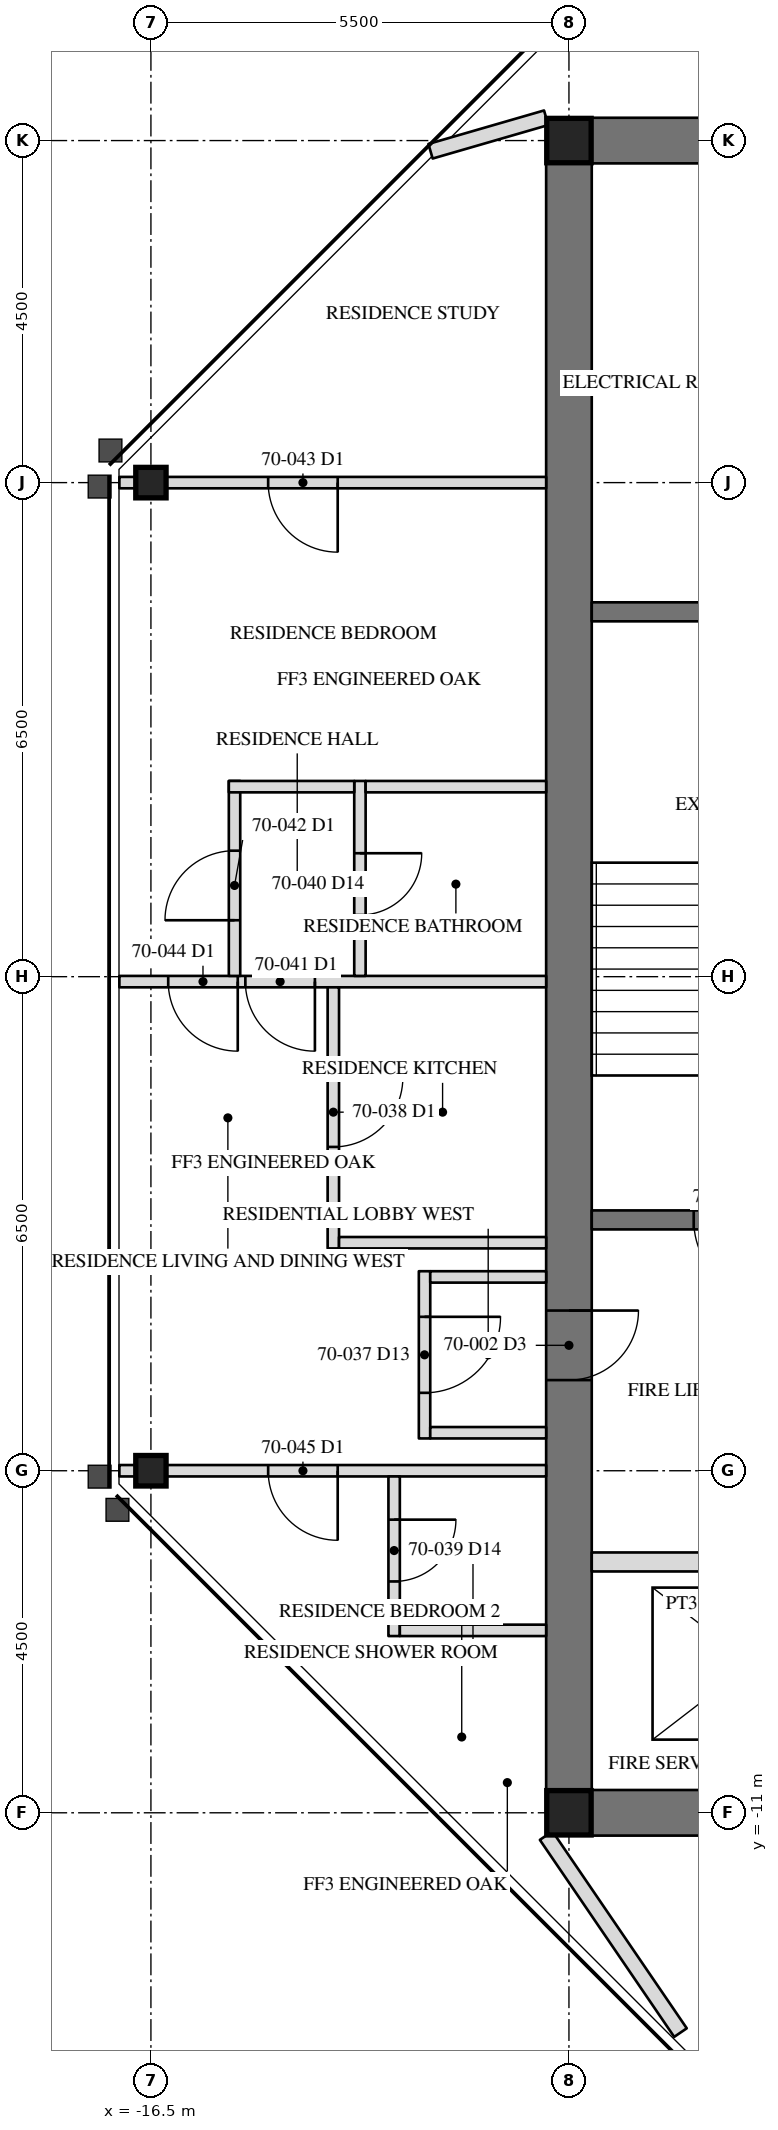
"""IFC4 building model, lengths in metres.
Left out: names, types, materials, properties, quantities, classifications, styles, units other than length and angle.
Written with IfcOpenShell. Run it as: python <this file> out.ifc"""

import sys

from ifc_helpers import new_model, si_unit, direction, frame, frame_2d, origin, origin_2d, place, context, subcontext, project, spatial, rectangle, hollow_rectangle, i_section, extrude, element, fill, save


model = new_model("IFC4")
c1 = context("Model", 3, precision=1e-05, world=origin(), true_north=direction((0.0, 1.0)))
c2 = subcontext(c1, "Body", "Model", "MODEL_VIEW")
j1 = project(units=[si_unit("LENGTHUNIT", "METRE"), si_unit("PLANEANGLEUNIT", "RADIAN")], contexts=[c1])
p1 = place(None, origin())
s1 = spatial("IfcSite", under=j1, at=p1, CompositionType="ELEMENT")
p2 = place(p1, origin())
s2 = spatial("IfcBuilding", under=s1, at=p2, CompositionType="ELEMENT")
p3 = place(p2, frame((0.0, 0.0, 284.8)))
s3 = spatial("IfcBuildingStorey", under=s2, at=p3, CompositionType="ELEMENT", Elevation=284.8)
for number, where, z_axis, x_axis in (
    (1, (-16.5, -6.5, 0.0), (0.0, 0.0, 1.0), (0.0, 1.0, 0.0)),
    (2, (-16.5, 6.5, 0.0), (0.0, 0.0, 1.0), (0.0, 1.0, 0.0)),
):
    element("IfcColumn", number, at=place(p3, frame(where, z_axis=z_axis, x_axis=x_axis)), inside=s3, PredefinedType="COLUMN", context=c2, shape_type="SweptSolid", body=[
        extrude(i_section(OverallWidth=0.401, OverallDepth=0.399, WebThickness=0.025, FlangeThickness=0.04, at=origin_2d()), origin(), (0.0, 0.0, 1.0), 3.6),
    ])
p4 = place(p3, frame((-11.0, 11.0, 0.0), z_axis=(0.0, 0.0, 1.0), x_axis=(0.0, -1.0, 0.0)))
e3 = element("IfcWall", 3, at=p4, inside=s3, PredefinedType="SHEAR", context=c2, shape_type="SweptSolid", body=[
    extrude(rectangle(XDim=22.0, YDim=0.6, at=frame_2d((11.0, 0.0))), origin(), (0.0, 0.0, 1.0), 3.6),
])
p5 = place(p4, frame((15.393, 0.0, 0.0)))
e4 = element("IfcOpeningElement", 4, at=p5, cuts=e3, PredefinedType="OPENING", context=c2, shape_type="SweptSolid", body=[
    extrude(rectangle(XDim=0.915, YDim=2.134, at=frame_2d((0.458, 1.067))), frame((0.0, 0.31, 0.0), z_axis=(0.0, -1.0, 0.0), x_axis=(1.0, 0.0, 0.0)), (0.0, 0.0, 1.0), 0.62),
])
for number, where, z_axis, x_axis in (
    (5, (-6.5, 11.0, 0.0), (0.0, 0.0, 1.0), (-1.0, 0.0, 0.0)),
    (6, (-11.0, -11.0, 0.0), (0.0, 0.0, 1.0), (1.0, 0.0, 0.0)),
):
    element("IfcWall", number, at=place(p3, frame(where, z_axis=z_axis, x_axis=x_axis)), inside=s3, PredefinedType="SHEAR", context=c2, shape_type="SweptSolid", body=[
        extrude(rectangle(XDim=4.5, YDim=0.6, at=frame_2d((2.25, 0.0))), origin(), (0.0, 0.0, 1.0), 3.6),
    ])
for number, where, z_axis, x_axis in (
    (7, (-11.0, 11.0, 0.0), (0.0, 0.0, 1.0), (1.0, 0.0, 0.0)),
    (8, (-11.0, -11.0, 0.0), (0.0, 0.0, 1.0), (1.0, 0.0, 0.0)),
):
    element("IfcColumn", number, at=place(p3, frame(where, z_axis=z_axis, x_axis=x_axis)), inside=s3, PredefinedType="COLUMN", context=c2, shape_type="SweptSolid", body=[
        extrude(hollow_rectangle(XDim=0.584, YDim=0.584, WallThickness=0.051, at=origin_2d()), origin(), (0.0, 0.0, 1.0), 3.6),
    ])
p6 = place(p3, frame((-6.95, 4.8, 0.0), z_axis=(0.0, 0.0, 1.0), x_axis=(-1.0, 0.0, 0.0)))
e9 = element("IfcWall", 9, at=p6, inside=s3, PredefinedType="SOLIDWALL", context=c2, shape_type="SweptSolid", body=[
    extrude(rectangle(XDim=3.75, YDim=0.25, at=frame_2d((1.875, 0.0))), origin(), (0.0, 0.0, 1.0), 3.41),
])
p7 = place(p3, frame((-6.95, -3.2, 0.0), z_axis=(0.0, 0.0, 1.0), x_axis=(-1.0, 0.0, 0.0)))
e10 = element("IfcWall", 10, at=p7, inside=s3, PredefinedType="SOLIDWALL", context=c2, shape_type="SweptSolid", body=[
    extrude(rectangle(XDim=3.75, YDim=0.25, at=frame_2d((1.875, 0.0))), origin(), (0.0, 0.0, 1.0), 3.41),
])
p8 = place(p7, frame((1.342, 0.0, 0.0)))
e11 = element("IfcOpeningElement", 11, at=p8, cuts=e10, PredefinedType="OPENING", context=c2, shape_type="SweptSolid", body=[
    extrude(rectangle(XDim=1.067, YDim=2.134, at=frame_2d((0.533, 1.067))), frame((0.0, 0.135, 0.0), z_axis=(0.0, -1.0, 0.0), x_axis=(1.0, 0.0, 0.0)), (0.0, 0.0, 1.0), 0.27),
])
p9 = place(p3, frame((-6.95, -7.7, 0.0), z_axis=(0.0, 0.0, 1.0), x_axis=(-1.0, 0.0, 0.0)))
e12 = element("IfcWall", 12, at=p9, inside=s3, PredefinedType="PARTITIONING", context=c2, shape_type="SweptSolid", body=[
    extrude(rectangle(XDim=3.75, YDim=0.25, at=frame_2d((1.875, 0.0))), origin(), (0.0, 0.0, 1.0), 3.41),
])
p10 = place(p9, frame((0.45, 0.0, 0.0)))
e13 = element("IfcOpeningElement", 13, at=p10, cuts=e12, PredefinedType="OPENING", context=c2, shape_type="SweptSolid", body=[
    extrude(rectangle(XDim=1.219, YDim=2.134, at=frame_2d((0.609, 1.067))), frame((0.0, 0.135, 0.0), z_axis=(0.0, -1.0, 0.0), x_axis=(1.0, 0.0, 0.0)), (0.0, 0.0, 1.0), 0.27),
])
p11 = place(p3, frame((-11.3, 11.3, 0.0), z_axis=(0.0, 0.0, 1.0), x_axis=(-0.960552344683, -0.278099250491, 0.0)))
e14 = element("IfcWall", 14, at=p11, inside=s3, PredefinedType="PARTITIONING", context=c2, shape_type="SweptSolid", body=[
    extrude(rectangle(XDim=1.584, YDim=0.2, at=frame_2d((0.792, 0.0))), origin(), (0.0, 0.0, 1.0), 3.41),
])
p12 = place(p3, frame((-11.3, -11.3, 0.0), z_axis=(0.0, 0.0, 1.0), x_axis=(0.563469639691, -0.826136771453, 0.0)))
e15 = element("IfcWall", 15, at=p12, inside=s3, PredefinedType="PARTITIONING", context=c2, shape_type="SweptSolid", body=[
    extrude(rectangle(XDim=3.137, YDim=0.2, at=frame_2d((1.568, 0.0))), origin(), (0.0, 0.0, 1.0), 2.704),
])
p13 = place(p3, frame((-11.3, 6.5, 0.0), z_axis=(0.0, 0.0, 1.0), x_axis=(-1.0, 0.0, 0.0)))
e16 = element("IfcWall", 16, at=p13, inside=s3, PredefinedType="PARTITIONING", context=c2, shape_type="SweptSolid", body=[
    extrude(rectangle(XDim=5.615, YDim=0.15, at=frame_2d((2.808, 0.0))), origin(), (0.0, 0.0, 1.0), 2.966),
])
p14 = place(p13, frame((2.742, 0.0, 0.0)))
e17 = element("IfcOpeningElement", 17, at=p14, cuts=e16, PredefinedType="OPENING", context=c2, shape_type="SweptSolid", body=[
    extrude(rectangle(XDim=0.915, YDim=2.134, at=frame_2d((0.458, 1.067))), frame((0.0, 0.085, 0.0), z_axis=(0.0, -1.0, 0.0), x_axis=(1.0, 0.0, 0.0)), (0.0, 0.0, 1.0), 0.17),
])
p15 = place(p3, frame((-11.3, -0.065, 0.0), z_axis=(0.0, 0.0, 1.0), x_axis=(-1.0, 0.0, 0.0)))
e18 = element("IfcWall", 18, at=p15, inside=s3, PredefinedType="PARTITIONING", context=c2, shape_type="SweptSolid", body=[
    extrude(rectangle(XDim=5.615, YDim=0.15, at=frame_2d((2.808, 0.0))), origin(), (0.0, 0.0, 1.0), 2.709),
])
p16 = place(p15, frame((3.042, 0.0, 0.0)))
e19 = element("IfcOpeningElement", 19, at=p16, cuts=e18, PredefinedType="OPENING", context=c2, shape_type="SweptSolid", body=[
    extrude(rectangle(XDim=0.915, YDim=2.134, at=frame_2d((0.458, 1.067))), frame((0.0, 0.085, 0.0), z_axis=(0.0, -1.0, 0.0), x_axis=(1.0, 0.0, 0.0)), (0.0, 0.0, 1.0), 0.17),
])
p17 = place(p15, frame((4.058, 0.0, 0.0)))
e20 = element("IfcOpeningElement", 20, at=p17, cuts=e18, PredefinedType="OPENING", context=c2, shape_type="SweptSolid", body=[
    extrude(rectangle(XDim=0.915, YDim=2.134, at=frame_2d((0.458, 1.067))), frame((0.0, 0.085, 0.0), z_axis=(0.0, -1.0, 0.0), x_axis=(1.0, 0.0, 0.0)), (0.0, 0.0, 1.0), 0.17),
])
p18 = place(p3, frame((-11.3, -6.5, 0.0), z_axis=(0.0, 0.0, 1.0), x_axis=(-1.0, 0.0, 0.0)))
e21 = element("IfcWall", 21, at=p18, inside=s3, PredefinedType="PARTITIONING", context=c2, shape_type="SweptSolid", body=[
    extrude(rectangle(XDim=5.615, YDim=0.15, at=frame_2d((2.808, 0.0))), origin(), (0.0, 0.0, 1.0), 2.966),
])
p19 = place(p18, frame((2.742, 0.0, 0.0)))
e22 = element("IfcOpeningElement", 22, at=p19, cuts=e21, PredefinedType="OPENING", context=c2, shape_type="SweptSolid", body=[
    extrude(rectangle(XDim=0.915, YDim=2.134, at=frame_2d((0.458, 1.067))), frame((0.0, 0.085, 0.0), z_axis=(0.0, -1.0, 0.0), x_axis=(1.0, 0.0, 0.0)), (0.0, 0.0, 1.0), 0.17),
])
p20 = place(p3, frame((-12.9, -3.875, 0.0), z_axis=(0.0, 0.0, 1.0), x_axis=(0.0, -1.0, 0.0)))
e23 = element("IfcWall", 23, at=p20, inside=s3, PredefinedType="PARTITIONING", context=c2, shape_type="SweptSolid", body=[
    extrude(rectangle(XDim=2.2, YDim=0.15, at=frame_2d((1.1, 0.0))), origin(), (0.0, 0.0, 1.0), 3.41),
])
p21 = place(p20, frame((0.6, 0.0, 0.0)))
e24 = element("IfcOpeningElement", 24, at=p21, cuts=e23, PredefinedType="OPENING", context=c2, shape_type="SweptSolid", body=[
    extrude(rectangle(XDim=1.0, YDim=2.134, at=frame_2d((0.5, 1.067))), frame((0.0, 0.085, 0.0), z_axis=(0.0, -1.0, 0.0), x_axis=(1.0, 0.0, 0.0)), (0.0, 0.0, 1.0), 0.17),
])
for number, where, z_axis, x_axis in (
    (25, (-11.3, -3.95, 0.0), (0.0, 0.0, 1.0), (-1.0, 0.0, 0.0)),
    (26, (-11.3, -6.0, 0.0), (0.0, 0.0, 1.0), (-1.0, 0.0, 0.0)),
):
    element("IfcWall", number, at=place(p3, frame(where, z_axis=z_axis, x_axis=x_axis)), inside=s3, PredefinedType="PARTITIONING", context=c2, shape_type="SweptSolid", body=[
        extrude(rectangle(XDim=1.525, YDim=0.15, at=frame_2d((0.762, 0.0))), origin(), (0.0, 0.0, 1.0), 3.41),
    ])
p22 = place(p3, frame((-14.1, -0.14, 0.0), z_axis=(0.0, 0.0, 1.0), x_axis=(0.0, -1.0, 0.0)))
e27 = element("IfcWall", 27, at=p22, inside=s3, PredefinedType="PARTITIONING", context=c2, shape_type="SweptSolid", body=[
    extrude(rectangle(XDim=3.435, YDim=0.15, at=frame_2d((1.718, 0.0))), origin(), (0.0, 0.0, 1.0), 3.41),
])
p23 = place(p22, frame((1.185, 0.0, 0.0)))
e28 = element("IfcOpeningElement", 28, at=p23, cuts=e27, PredefinedType="OPENING", context=c2, shape_type="SweptSolid", body=[
    extrude(rectangle(XDim=0.915, YDim=2.134, at=frame_2d((0.458, 1.067))), frame((0.0, 0.085, 0.0), z_axis=(0.0, -1.0, 0.0), x_axis=(1.0, 0.0, 0.0)), (0.0, 0.0, 1.0), 0.17),
])
p24 = place(p3, frame((-11.3, -3.5, 0.0), z_axis=(0.0, 0.0, 1.0), x_axis=(-1.0, 0.0, 0.0)))
e29 = element("IfcWall", 29, at=p24, inside=s3, PredefinedType="PARTITIONING", context=c2, shape_type="SweptSolid", body=[
    extrude(rectangle(XDim=2.725, YDim=0.15, at=frame_2d((1.362, 0.0))), origin(), (0.0, 0.0, 1.0), 3.41),
])
p25 = place(p3, frame((-13.3, -6.575, 0.0), z_axis=(0.0, 0.0, 1.0), x_axis=(0.0, -1.0, 0.0)))
e30 = element("IfcWall", 30, at=p25, inside=s3, PredefinedType="PARTITIONING", context=c2, shape_type="SweptSolid", body=[
    extrude(rectangle(XDim=2.1, YDim=0.15, at=frame_2d((1.05, 0.0))), origin(), (0.0, 0.0, 1.0), 3.41),
])
p26 = place(p25, frame((0.569, 0.0, 0.0)))
e31 = element("IfcOpeningElement", 31, at=p26, cuts=e30, PredefinedType="OPENING", context=c2, shape_type="SweptSolid", body=[
    extrude(rectangle(XDim=0.813, YDim=2.032, at=frame_2d((0.406, 1.016))), frame((0.0, 0.085, 0.0), z_axis=(0.0, -1.0, 0.0), x_axis=(1.0, 0.0, 0.0)), (0.0, 0.0, 1.0), 0.17),
])
p27 = place(p3, frame((-11.3, -8.6, 0.0), z_axis=(0.0, 0.0, 1.0), x_axis=(-1.0, 0.0, 0.0)))
e32 = element("IfcWall", 32, at=p27, inside=s3, PredefinedType="PARTITIONING", context=c2, shape_type="SweptSolid", body=[
    extrude(rectangle(XDim=1.925, YDim=0.15, at=frame_2d((0.962, 0.0))), origin(), (0.0, 0.0, 1.0), 3.41),
])
p28 = place(p3, frame((-13.75, 2.575, 0.0), z_axis=(0.0, 0.0, 1.0), x_axis=(0.0, -1.0, 0.0)))
e33 = element("IfcWall", 33, at=p28, inside=s3, PredefinedType="PARTITIONING", context=c2, shape_type="SweptSolid", body=[
    extrude(rectangle(XDim=2.565, YDim=0.15, at=frame_2d((1.282, 0.0))), origin(), (0.0, 0.0, 1.0), 3.41),
])
p29 = place(p28, frame((0.951, 0.0, 0.0)))
e34 = element("IfcOpeningElement", 34, at=p29, cuts=e33, PredefinedType="OPENING", context=c2, shape_type="SweptSolid", body=[
    extrude(rectangle(XDim=0.813, YDim=2.032, at=frame_2d((0.406, 1.016))), frame((0.0, 0.085, 0.0), z_axis=(0.0, -1.0, 0.0), x_axis=(1.0, 0.0, 0.0)), (0.0, 0.0, 1.0), 0.17),
])
p30 = place(p3, frame((-11.3, 2.5, 0.0), z_axis=(0.0, 0.0, 1.0), x_axis=(-1.0, 0.0, 0.0)))
e35 = element("IfcWall", 35, at=p30, inside=s3, PredefinedType="PARTITIONING", context=c2, shape_type="SweptSolid", body=[
    extrude(rectangle(XDim=2.375, YDim=0.15, at=frame_2d((1.188, 0.0))), origin(), (0.0, 0.0, 1.0), 3.41),
])
p31 = place(p3, frame((-15.4, 0.01, 0.0), z_axis=(0.0, 0.0, 1.0), x_axis=(0.0, 1.0, 0.0)))
e36 = element("IfcWall", 36, at=p31, inside=s3, PredefinedType="PARTITIONING", context=c2, shape_type="SweptSolid", body=[
    extrude(rectangle(XDim=2.565, YDim=0.15, at=frame_2d((1.282, 0.0))), origin(), (0.0, 0.0, 1.0), 3.41),
])
p32 = place(p31, frame((0.732, 0.0, 0.0)))
e37 = element("IfcOpeningElement", 37, at=p32, cuts=e36, PredefinedType="OPENING", context=c2, shape_type="SweptSolid", body=[
    extrude(rectangle(XDim=0.915, YDim=2.134, at=frame_2d((0.458, 1.067))), frame((0.0, 0.085, 0.0), z_axis=(0.0, -1.0, 0.0), x_axis=(1.0, 0.0, 0.0)), (0.0, 0.0, 1.0), 0.17),
])
p33 = place(p3, frame((-13.825, 2.5, 0.0), z_axis=(0.0, 0.0, 1.0), x_axis=(-1.0, 0.0, 0.0)))
e38 = element("IfcWall", 38, at=p33, inside=s3, PredefinedType="PARTITIONING", context=c2, shape_type="SweptSolid", body=[
    extrude(rectangle(XDim=1.65, YDim=0.15, at=frame_2d((0.825, 0.0))), origin(), (0.0, 0.0, 1.0), 3.41),
])
p34 = place(p5, origin())
e39 = element("IfcDoor", 39, at=p34, inside=s3, OperationType="SINGLE_SWING_RIGHT", PredefinedType="DOOR", context=c2, shape_type="SweptSolid", body=[
    extrude(rectangle(XDim=0.915, YDim=2.134, at=frame_2d((0.458, 1.067))), frame((0.0, -0.225, 0.0), z_axis=(0.0, -1.0, 0.0), x_axis=(1.0, 0.0, 0.0)), (0.0, 0.0, 1.0), 0.05),
])
fill(e4, e39)
p35 = place(p8, origin())
e40 = element("IfcDoor", 40, at=p35, inside=s3, OperationType="SINGLE_SWING_LEFT", PredefinedType="DOOR", context=c2, shape_type="SweptSolid", body=[
    extrude(rectangle(XDim=1.067, YDim=2.134, at=frame_2d((0.533, 1.067))), frame((0.0, 0.025, 0.0), z_axis=(0.0, -1.0, 0.0), x_axis=(1.0, 0.0, 0.0)), (0.0, 0.0, 1.0), 0.05),
])
fill(e11, e40)
p36 = place(p21, origin())
e41 = element("IfcDoor", 41, at=p36, inside=s3, OperationType="SINGLE_SWING_RIGHT", PredefinedType="DOOR", context=c2, shape_type="SweptSolid", body=[
    extrude(rectangle(XDim=1.0, YDim=2.134, at=frame_2d((0.5, 1.067))), frame((0.0, 0.025, 0.0), z_axis=(0.0, -1.0, 0.0), x_axis=(1.0, 0.0, 0.0)), (0.0, 0.0, 1.0), 0.05),
])
fill(e24, e41)
p37 = place(p23, origin())
e42 = element("IfcDoor", 42, at=p37, inside=s3, OperationType="SINGLE_SWING_LEFT", PredefinedType="DOOR", context=c2, shape_type="SweptSolid", body=[
    extrude(rectangle(XDim=0.915, YDim=2.134, at=frame_2d((0.458, 1.067))), frame((0.0, 0.025, 0.0), z_axis=(0.0, -1.0, 0.0), x_axis=(1.0, 0.0, 0.0)), (0.0, 0.0, 1.0), 0.05),
])
fill(e28, e42)
p38 = place(p26, origin())
e43 = element("IfcDoor", 43, at=p38, inside=s3, OperationType="SINGLE_SWING_LEFT", PredefinedType="DOOR", context=c2, shape_type="SweptSolid", body=[
    extrude(rectangle(XDim=0.813, YDim=2.032, at=frame_2d((0.406, 1.016))), frame((0.0, 0.025, 0.0), z_axis=(0.0, -1.0, 0.0), x_axis=(1.0, 0.0, 0.0)), (0.0, 0.0, 1.0), 0.05),
])
fill(e31, e43)
p39 = place(p29, origin())
e44 = element("IfcDoor", 44, at=p39, inside=s3, OperationType="SINGLE_SWING_LEFT", PredefinedType="DOOR", context=c2, shape_type="SweptSolid", body=[
    extrude(rectangle(XDim=0.813, YDim=2.032, at=frame_2d((0.406, 1.016))), frame((0.0, 0.025, 0.0), z_axis=(0.0, -1.0, 0.0), x_axis=(1.0, 0.0, 0.0)), (0.0, 0.0, 1.0), 0.05),
])
fill(e34, e44)
p40 = place(p16, origin())
e45 = element("IfcDoor", 45, at=p40, inside=s3, OperationType="SINGLE_SWING_LEFT", PredefinedType="DOOR", context=c2, shape_type="SweptSolid", body=[
    extrude(rectangle(XDim=0.915, YDim=2.134, at=frame_2d((0.458, 1.067))), frame((0.0, 0.025, 0.0), z_axis=(0.0, -1.0, 0.0), x_axis=(1.0, 0.0, 0.0)), (0.0, 0.0, 1.0), 0.05),
])
fill(e19, e45)
p41 = place(p32, origin())
e46 = element("IfcDoor", 46, at=p41, inside=s3, OperationType="SINGLE_SWING_LEFT", PredefinedType="DOOR", context=c2, shape_type="SweptSolid", body=[
    extrude(rectangle(XDim=0.915, YDim=2.134, at=frame_2d((0.458, 1.067))), frame((0.0, 0.025, 0.0), z_axis=(0.0, -1.0, 0.0), x_axis=(1.0, 0.0, 0.0)), (0.0, 0.0, 1.0), 0.05),
])
fill(e37, e46)
p42 = place(p14, origin())
e47 = element("IfcDoor", 47, at=p42, inside=s3, OperationType="SINGLE_SWING_LEFT", PredefinedType="DOOR", context=c2, shape_type="SweptSolid", body=[
    extrude(rectangle(XDim=0.915, YDim=2.134, at=frame_2d((0.458, 1.067))), frame((0.0, 0.025, 0.0), z_axis=(0.0, -1.0, 0.0), x_axis=(1.0, 0.0, 0.0)), (0.0, 0.0, 1.0), 0.05),
])
fill(e17, e47)
p43 = place(p17, origin())
e48 = element("IfcDoor", 48, at=p43, inside=s3, OperationType="SINGLE_SWING_LEFT", PredefinedType="DOOR", context=c2, shape_type="SweptSolid", body=[
    extrude(rectangle(XDim=0.915, YDim=2.134, at=frame_2d((0.458, 1.067))), frame((0.0, 0.025, 0.0), z_axis=(0.0, -1.0, 0.0), x_axis=(1.0, 0.0, 0.0)), (0.0, 0.0, 1.0), 0.05),
])
fill(e20, e48)
p44 = place(p19, origin())
e49 = element("IfcDoor", 49, at=p44, inside=s3, OperationType="SINGLE_SWING_LEFT", PredefinedType="DOOR", context=c2, shape_type="SweptSolid", body=[
    extrude(rectangle(XDim=0.915, YDim=2.134, at=frame_2d((0.458, 1.067))), frame((0.0, 0.025, 0.0), z_axis=(0.0, -1.0, 0.0), x_axis=(1.0, 0.0, 0.0)), (0.0, 0.0, 1.0), 0.05),
])
fill(e22, e49)
save(model, sys.argv[1])
